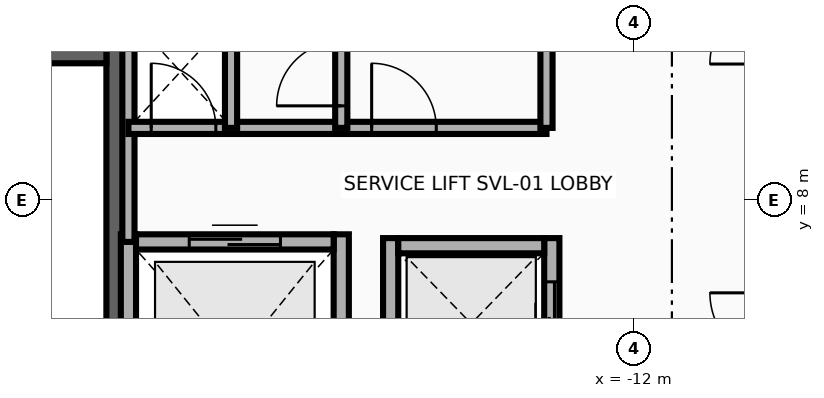
"""IFC4 building model, lengths in metres.
Left out: names, types, materials, properties, quantities, classifications, styles, units other than length and angle.
Written with IfcOpenShell. Run it as: python <this file> out.ifc"""

import sys

from ifc_helpers import new_model, si_unit, direction, frame, frame_2d, origin, place, context, subcontext, project, spatial, rectangle, extrude, element, fill, save


model = new_model("IFC4")
c1 = context("Model", 3, precision=1e-05, world=origin(), true_north=direction((0.0, 1.0)))
c2 = subcontext(c1, "Body", "Model", "MODEL_VIEW")
j1 = project(units=[si_unit("LENGTHUNIT", "METRE"), si_unit("PLANEANGLEUNIT", "RADIAN")], contexts=[c1])
p1 = place(None, origin())
s1 = spatial("IfcSite", under=j1, at=p1, CompositionType="ELEMENT")
p2 = place(p1, origin())
s2 = spatial("IfcBuilding", under=s1, at=p2, CompositionType="ELEMENT")
p3 = place(p2, frame((0.0, 0.0, 212.5)))
s3 = spatial("IfcBuildingStorey", under=s2, at=p3, CompositionType="ELEMENT", Elevation=212.5)
p4 = place(p3, frame((-18.83, 1.78, 0.0), z_axis=(0.0, 0.0, 1.0), x_axis=(0.0, 1.0, 0.0)))
e1 = element("IfcWall", 1, at=p4, inside=s3, PredefinedType="SHEAR", context=c2, shape_type="SweptSolid", body=[
    extrude(rectangle(XDim=8.745, YDim=0.22, at=frame_2d((4.373, 0.0))), origin(), (0.0, 0.0, 1.0), 3.26),
])
p5 = place(p3, frame((-22.05, 9.91, 0.0), z_axis=(0.0, 0.0, 1.0), x_axis=(1.0, 0.0, 0.0)))
e2 = element("IfcWall", 2, at=p5, inside=s3, PredefinedType="SHEAR", context=c2, shape_type="SweptSolid", body=[
    extrude(rectangle(XDim=3.11, YDim=0.22, at=frame_2d((1.555, 0.0))), origin(), (0.0, 0.0, 1.0), 3.26),
])
for number, where, z_axis, x_axis in (
    (3, (-18.65, 4.225, 0.0), (0.0, 0.0, 1.0), (0.0, 1.0, 0.0)),
    (4, (-15.85, 4.225, 0.0), (0.0, 0.0, 1.0), (0.0, 1.0, 0.0)),
):
    element("IfcWall", number, at=place(p3, frame(where, z_axis=z_axis, x_axis=x_axis)), inside=s3, PredefinedType="MOVABLE", context=c2, shape_type="SweptSolid", body=[
        extrude(rectangle(XDim=3.325, YDim=0.2, at=frame_2d((1.663, 0.0))), origin(), (0.0, 0.0, 1.0), 3.26),
    ])
p6 = place(p3, frame((-18.55, 7.45, 0.0), z_axis=(0.0, 0.0, 1.0), x_axis=(1.0, 0.0, 0.0)))
e5 = element("IfcWall", 5, at=p6, inside=s3, PredefinedType="MOVABLE", context=c2, shape_type="SweptSolid", body=[
    extrude(rectangle(XDim=2.6, YDim=0.2, at=frame_2d((1.3, 0.0))), origin(), (0.0, 0.0, 1.0), 3.26),
])
p7 = place(p6, frame((0.7, 0.0, 0.0)))
e6 = element("IfcOpeningElement", 6, at=p7, cuts=e5, PredefinedType="OPENING", context=c2, shape_type="SweptSolid", body=[
    extrude(rectangle(XDim=1.2, YDim=2.1, at=frame_2d((0.6, 1.05))), frame((0.0, 0.115, 0.0), z_axis=(0.0, -1.0, 0.0), x_axis=(1.0, 0.0, 0.0)), (0.0, 0.0, 1.0), 0.23),
])
p8 = place(p3, frame((-15.2, 5.25, 0.0), z_axis=(0.0, 0.0, 1.0), x_axis=(0.0, 1.0, 0.0)))
e7 = element("IfcWall", 7, at=p8, inside=s3, PredefinedType="MOVABLE", context=c2, shape_type="SweptSolid", body=[
    extrude(rectangle(XDim=2.25, YDim=0.2, at=frame_2d((1.125, 0.0))), origin(), (0.0, 0.0, 1.0), 3.26),
])
p9 = place(p3, frame((-13.08, 5.25, 0.0), z_axis=(0.0, 0.0, 1.0), x_axis=(0.0, 1.0, 0.0)))
e8 = element("IfcWall", 8, at=p9, inside=s3, PredefinedType="MOVABLE", context=c2, shape_type="SweptSolid", body=[
    extrude(rectangle(XDim=2.25, YDim=0.2, at=frame_2d((1.125, 0.0))), origin(), (0.0, 0.0, 1.0), 3.26),
])
p10 = place(p9, frame((0.575, 0.0, 0.0)))
e9 = element("IfcOpeningElement", 9, at=p10, cuts=e8, PredefinedType="OPENING", context=c2, shape_type="SweptSolid", body=[
    extrude(rectangle(XDim=1.1, YDim=2.1, at=frame_2d((0.55, 1.05))), frame((0.0, 0.115, 0.0), z_axis=(0.0, -1.0, 0.0), x_axis=(1.0, 0.0, 0.0)), (0.0, 0.0, 1.0), 0.23),
])
p11 = place(p3, frame((-15.1, 7.4, 0.0), z_axis=(0.0, 0.0, 1.0), x_axis=(1.0, 0.0, 0.0)))
e10 = element("IfcWall", 10, at=p11, inside=s3, PredefinedType="MOVABLE", context=c2, shape_type="SweptSolid", body=[
    extrude(rectangle(XDim=1.92, YDim=0.2, at=frame_2d((0.96, 0.0))), origin(), (0.0, 0.0, 1.0), 3.26),
])
p12 = place(p3, frame((-18.65, 7.45, 0.0), z_axis=(0.0, 0.0, 1.0), x_axis=(0.0, 1.0, 0.0)))
e11 = element("IfcWall", 11, at=p12, inside=s3, PredefinedType="PARTITIONING", context=c2, shape_type="SweptSolid", body=[
    extrude(rectangle(XDim=2.93, YDim=0.16, at=frame_2d((1.465, 0.0))), origin(), (0.0, 0.0, 1.0), 3.26),
])
p13 = place(p3, frame((-18.65, 8.95, 0.0), z_axis=(0.0, 0.0, 1.0), x_axis=(1.0, 0.0, 0.0)))
e12 = element("IfcWall", 12, at=p13, inside=s3, PredefinedType="PARTITIONING", context=c2, shape_type="SweptSolid", body=[
    extrude(rectangle(XDim=5.5, YDim=0.16, at=frame_2d((2.75, 0.0))), origin(), (0.0, 0.0, 1.0), 3.26),
])
p14 = place(p13, frame((0.3, 0.0, 0.0)))
e13 = element("IfcOpeningElement", 13, at=p14, cuts=e12, PredefinedType="OPENING", context=c2, shape_type="SweptSolid", body=[
    extrude(rectangle(XDim=0.85, YDim=2.05, at=frame_2d((0.425, 1.025))), frame((0.0, 0.095, 0.0), z_axis=(0.0, -1.0, 0.0), x_axis=(1.0, 0.0, 0.0)), (0.0, 0.0, 1.0), 0.19),
])
p15 = place(p13, frame((3.2, 0.0, 0.0)))
e14 = element("IfcOpeningElement", 14, at=p15, cuts=e12, PredefinedType="OPENING", context=c2, shape_type="SweptSolid", body=[
    extrude(rectangle(XDim=0.85, YDim=2.05, at=frame_2d((0.425, 1.025))), frame((0.0, 0.095, 0.0), z_axis=(0.0, -1.0, 0.0), x_axis=(1.0, 0.0, 0.0)), (0.0, 0.0, 1.0), 0.19),
])
for number, where, z_axis, x_axis in (
    (15, (-13.15, 8.95, 0.0), (0.0, 0.0, 1.0), (0.0, 1.0, 0.0)),
    (16, (-17.3, 8.95, 0.0), (0.0, 0.0, 1.0), (0.0, 1.0, 0.0)),
):
    element("IfcWall", number, at=place(p3, frame(where, z_axis=z_axis, x_axis=x_axis)), inside=s3, PredefinedType="PARTITIONING", context=c2, shape_type="SweptSolid", body=[
        extrude(rectangle(XDim=1.43, YDim=0.16, at=frame_2d((0.715, 0.0))), origin(), (0.0, 0.0, 1.0), 3.26),
    ])
p16 = place(p3, frame((-15.85, 8.95, 0.0), z_axis=(0.0, 0.0, 1.0), x_axis=(0.0, 1.0, 0.0)))
e17 = element("IfcWall", 17, at=p16, inside=s3, PredefinedType="PARTITIONING", context=c2, shape_type="SweptSolid", body=[
    extrude(rectangle(XDim=1.43, YDim=0.16, at=frame_2d((0.715, 0.0))), origin(), (0.0, 0.0, 1.0), 3.26),
])
p17 = place(p16, frame((0.29, 0.0, 0.0)))
e18 = element("IfcOpeningElement", 18, at=p17, cuts=e17, PredefinedType="OPENING", context=c2, shape_type="SweptSolid", body=[
    extrude(rectangle(XDim=0.85, YDim=2.05, at=frame_2d((0.425, 1.025))), frame((0.0, 0.095, 0.0), z_axis=(0.0, -1.0, 0.0), x_axis=(1.0, 0.0, 0.0)), (0.0, 0.0, 1.0), 0.19),
])
p18 = place(p7, origin())
e19 = element("IfcDoor", 19, at=p18, inside=s3, OperationType="DOUBLE_DOOR_SLIDING", PredefinedType="DOOR", context=c2, shape_type="SweptSolid", body=[
    extrude(rectangle(XDim=1.2, YDim=2.1, at=frame_2d((0.6, 1.05))), frame((0.0, 0.025, 0.0), z_axis=(0.0, -1.0, 0.0), x_axis=(1.0, 0.0, 0.0)), (0.0, 0.0, 1.0), 0.05),
])
fill(e6, e19)
p19 = place(p10, origin())
e20 = element("IfcDoor", 20, at=p19, inside=s3, OperationType="DOUBLE_DOOR_SLIDING", PredefinedType="DOOR", context=c2, shape_type="SweptSolid", body=[
    extrude(rectangle(XDim=1.1, YDim=2.1, at=frame_2d((0.55, 1.05))), frame((0.0, 0.025, 0.0), z_axis=(0.0, -1.0, 0.0), x_axis=(1.0, 0.0, 0.0)), (0.0, 0.0, 1.0), 0.05),
])
fill(e9, e20)
p20 = place(p14, origin())
e21 = element("IfcDoor", 21, at=p20, inside=s3, OperationType="SINGLE_SWING_LEFT", PredefinedType="DOOR", context=c2, shape_type="SweptSolid", body=[
    extrude(rectangle(XDim=0.85, YDim=2.05, at=frame_2d((0.425, 1.025))), frame((0.0, 0.025, 0.0), z_axis=(0.0, -1.0, 0.0), x_axis=(1.0, 0.0, 0.0)), (0.0, 0.0, 1.0), 0.05),
])
fill(e13, e21)
p21 = place(p15, origin())
e22 = element("IfcDoor", 22, at=p21, inside=s3, OperationType="SINGLE_SWING_RIGHT", PredefinedType="DOOR", context=c2, shape_type="SweptSolid", body=[
    extrude(rectangle(XDim=0.85, YDim=2.05, at=frame_2d((0.425, 1.025))), frame((0.0, 0.025, 0.0), z_axis=(0.0, -1.0, 0.0), x_axis=(1.0, 0.0, 0.0)), (0.0, 0.0, 1.0), 0.05),
])
fill(e14, e22)
p22 = place(p17, origin())
e23 = element("IfcDoor", 23, at=p22, inside=s3, OperationType="SINGLE_SWING_LEFT", PredefinedType="DOOR", context=c2, shape_type="SweptSolid", body=[
    extrude(rectangle(XDim=0.85, YDim=2.05, at=frame_2d((0.425, 1.025))), frame((0.0, 0.025, 0.0), z_axis=(0.0, -1.0, 0.0), x_axis=(1.0, 0.0, 0.0)), (0.0, 0.0, 1.0), 0.05),
])
fill(e18, e23)
save(model, sys.argv[1])
